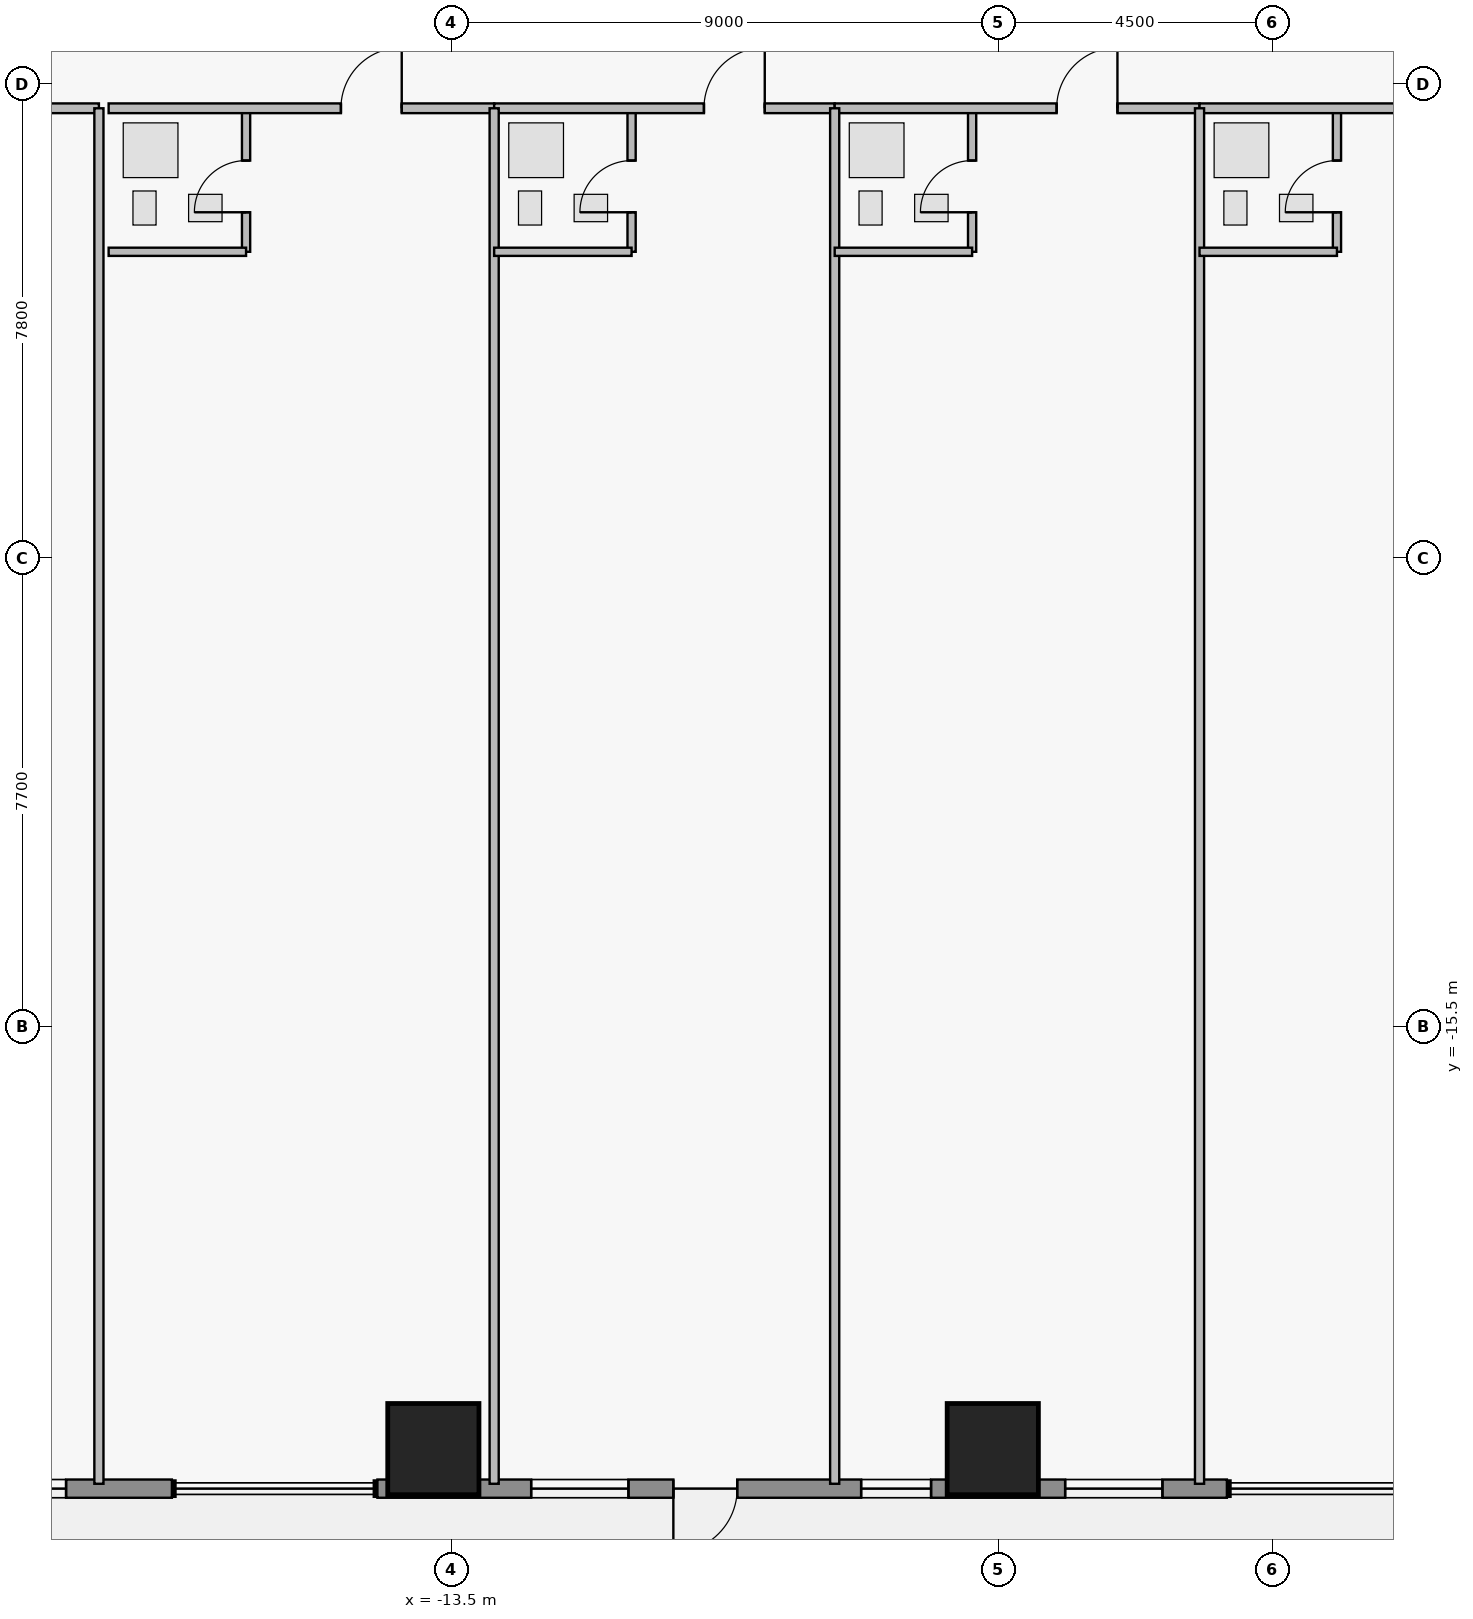
"""IFC4 building model, lengths in metres.
Left out: names, types, materials, properties, quantities, classifications, styles, units other than length and angle.
Written with IfcOpenShell. Run it as: python <this file> out.ifc"""

import sys

from ifc_helpers import new_model, si_unit, direction, frame, frame_2d, origin, origin_2d, place, context, subcontext, project, spatial, rectangle, extrude, element, fill, save


model = new_model("IFC4")
c1 = context("Model", 3, precision=1e-05, world=origin(), true_north=direction((0.0, 1.0)))
c2 = subcontext(c1, "Body", "Model", "MODEL_VIEW")
j1 = project(units=[si_unit("LENGTHUNIT", "METRE"), si_unit("PLANEANGLEUNIT", "RADIAN")], contexts=[c1])
p1 = place(None, origin())
s1 = spatial("IfcSite", under=j1, at=p1, CompositionType="ELEMENT")
p2 = place(p1, origin())
s2 = spatial("IfcBuilding", under=s1, at=p2, CompositionType="ELEMENT")
p3 = place(p2, frame((0.0, 0.0, 27.6)))
s3 = spatial("IfcBuildingStorey", under=s2, at=p3, CompositionType="ELEMENT", Elevation=27.6)
for number, where, z_axis, x_axis in (
    (1, (-13.8, -22.45, 0.0), (0.0, 0.0, 1.0), (1.0, 0.0, 0.0)),
    (2, (-4.6, -22.45, 0.0), (0.0, 0.0, 1.0), (1.0, 0.0, 0.0)),
):
    element("IfcColumn", number, at=place(p3, frame(where, z_axis=z_axis, x_axis=x_axis)), inside=s3, PredefinedType="COLUMN", context=c2, shape_type="SweptSolid", body=[
        extrude(rectangle(XDim=1.5, YDim=1.5, at=origin_2d()), origin(), (0.0, 0.0, 1.0), 3.65),
    ])
p4 = place(p3, frame((-0.75, -23.1, 0.0), z_axis=(0.0, 0.0, 1.0), x_axis=(-1.0, 0.0, 0.0)))
e3 = element("IfcWall", 3, at=p4, inside=s3, PredefinedType="STANDARD", context=c2, shape_type="SweptSolid", body=[
    extrude(rectangle(XDim=13.97, YDim=0.3, at=frame_2d((6.985, 0.0))), origin(), (0.0, 0.0, 1.0), 3.43),
])
p5 = place(p4, frame((8.053, 0.0, 0.0)))
e4 = element("IfcOpeningElement", 4, at=p5, cuts=e3, PredefinedType="OPENING", context=c2, shape_type="SweptSolid", body=[
    extrude(rectangle(XDim=1.05, YDim=2.2, at=frame_2d((0.525, 1.1))), frame((0.0, 0.16, 0.0), z_axis=(0.0, -1.0, 0.0), x_axis=(1.0, 0.0, 0.0)), (0.0, 0.0, 1.0), 0.32),
])
p6 = place(p4, frame((1.06, 0.0, 0.85)))
e5 = element("IfcOpeningElement", 5, at=p6, cuts=e3, PredefinedType="OPENING", context=c2, shape_type="SweptSolid", body=[
    extrude(rectangle(XDim=1.6, YDim=1.8, at=frame_2d((0.8, 0.9))), frame((0.0, 0.16, 0.0), z_axis=(0.0, -1.0, 0.0), x_axis=(1.0, 0.0, 0.0)), (0.0, 0.0, 1.0), 0.32),
])
p7 = place(p4, frame((4.865, 0.0, 0.95)))
e6 = element("IfcOpeningElement", 6, at=p7, cuts=e3, PredefinedType="OPENING", context=c2, shape_type="SweptSolid", body=[
    extrude(rectangle(XDim=1.15, YDim=1.55, at=frame_2d((0.575, 0.775))), frame((0.0, 0.16, 0.0), z_axis=(0.0, -1.0, 0.0), x_axis=(1.0, 0.0, 0.0)), (0.0, 0.0, 1.0), 0.32),
])
p8 = place(p4, frame((9.842, 0.0, 0.85)))
e7 = element("IfcOpeningElement", 7, at=p8, cuts=e3, PredefinedType="OPENING", context=c2, shape_type="SweptSolid", body=[
    extrude(rectangle(XDim=1.6, YDim=1.8, at=frame_2d((0.8, 0.9))), frame((0.0, 0.16, 0.0), z_axis=(0.0, -1.0, 0.0), x_axis=(1.0, 0.0, 0.0)), (0.0, 0.0, 1.0), 0.32),
])
p9 = place(p3, frame((-18.1, -23.1, 0.0), z_axis=(0.0, 0.0, 1.0), x_axis=(-1.0, 0.0, 0.0)))
e8 = element("IfcWall", 8, at=p9, inside=s3, PredefinedType="STANDARD", context=c2, shape_type="SweptSolid", body=[
    extrude(rectangle(XDim=4.0, YDim=0.3, at=frame_2d((2.0, 0.0))), origin(), (0.0, 0.0, 1.0), 3.43),
])
p10 = place(p9, frame((1.74, 0.0, 0.85)))
e9 = element("IfcOpeningElement", 9, at=p10, cuts=e8, PredefinedType="OPENING", context=c2, shape_type="SweptSolid", body=[
    extrude(rectangle(XDim=1.6, YDim=1.8, at=frame_2d((0.8, 0.9))), frame((0.0, 0.16, 0.0), z_axis=(0.0, -1.0, 0.0), x_axis=(1.0, 0.0, 0.0)), (0.0, 0.0, 1.0), 0.32),
])
p11 = place(p3, frame((-25.64, -0.4, 0.0), z_axis=(0.0, 0.0, 1.0), x_axis=(1.0, 0.0, 0.0)))
e10 = element("IfcWall", 10, at=p11, inside=s3, PredefinedType="PARTITIONING", context=c2, shape_type="SweptSolid", body=[
    extrude(rectangle(XDim=6.34, YDim=0.16, at=frame_2d((3.17, 0.0))), origin(), (0.0, 0.0, 1.0), 3.43),
])
p12 = place(p11, frame((3.82, 0.0, 0.0)))
e11 = element("IfcOpeningElement", 11, at=p12, cuts=e10, PredefinedType="OPENING", context=c2, shape_type="SweptSolid", body=[
    extrude(rectangle(XDim=1.0, YDim=2.15, at=frame_2d((0.5, 1.075))), frame((0.0, 0.09, 0.0), z_axis=(0.0, -1.0, 0.0), x_axis=(1.0, 0.0, 0.0)), (0.0, 0.0, 1.0), 0.18),
])
p13 = place(p3, frame((-16.88, -2.76, 0.0), z_axis=(0.0, 0.0, 1.0), x_axis=(0.0, 1.0, 0.0)))
e12 = element("IfcWall", 12, at=p13, inside=s3, PredefinedType="PLUMBINGWALL", context=c2, shape_type="SweptSolid", body=[
    extrude(rectangle(XDim=2.36, YDim=0.135, at=frame_2d((1.18, 0.0))), origin(), (0.0, 0.0, 1.0), 3.43),
])
p14 = place(p13, frame((0.65, 0.0, 0.0)))
e13 = element("IfcOpeningElement", 13, at=p14, cuts=e12, PredefinedType="OPENING", context=c2, shape_type="SweptSolid", body=[
    extrude(rectangle(XDim=0.85, YDim=2.1, at=frame_2d((0.425, 1.05))), frame((0.0, 0.077, 0.0), z_axis=(0.0, -1.0, 0.0), x_axis=(1.0, 0.0, 0.0)), (0.0, 0.0, 1.0), 0.155),
])
p15 = place(p3, frame((-19.14, -0.4, 0.0), z_axis=(0.0, 0.0, 1.0), x_axis=(1.0, 0.0, 0.0)))
e14 = element("IfcWall", 14, at=p15, inside=s3, PredefinedType="PARTITIONING", context=c2, shape_type="SweptSolid", body=[
    extrude(rectangle(XDim=6.34, YDim=0.16, at=frame_2d((3.17, 0.0))), origin(), (0.0, 0.0, 1.0), 3.43),
])
p16 = place(p15, frame((3.82, 0.0, 0.0)))
e15 = element("IfcOpeningElement", 15, at=p16, cuts=e14, PredefinedType="OPENING", context=c2, shape_type="SweptSolid", body=[
    extrude(rectangle(XDim=1.0, YDim=2.15, at=frame_2d((0.5, 1.075))), frame((0.0, 0.09, 0.0), z_axis=(0.0, -1.0, 0.0), x_axis=(1.0, 0.0, 0.0)), (0.0, 0.0, 1.0), 0.18),
])
p17 = place(p3, frame((-10.54, -2.76, 0.0), z_axis=(0.0, 0.0, 1.0), x_axis=(0.0, 1.0, 0.0)))
e16 = element("IfcWall", 16, at=p17, inside=s3, PredefinedType="PLUMBINGWALL", context=c2, shape_type="SweptSolid", body=[
    extrude(rectangle(XDim=2.36, YDim=0.135, at=frame_2d((1.18, 0.0))), origin(), (0.0, 0.0, 1.0), 3.43),
])
p18 = place(p17, frame((0.65, 0.0, 0.0)))
e17 = element("IfcOpeningElement", 17, at=p18, cuts=e16, PredefinedType="OPENING", context=c2, shape_type="SweptSolid", body=[
    extrude(rectangle(XDim=0.85, YDim=2.1, at=frame_2d((0.425, 1.05))), frame((0.0, 0.077, 0.0), z_axis=(0.0, -1.0, 0.0), x_axis=(1.0, 0.0, 0.0)), (0.0, 0.0, 1.0), 0.155),
])
p19 = place(p3, frame((-12.8, -0.4, 0.0), z_axis=(0.0, 0.0, 1.0), x_axis=(1.0, 0.0, 0.0)))
e18 = element("IfcWall", 18, at=p19, inside=s3, PredefinedType="PARTITIONING", context=c2, shape_type="SweptSolid", body=[
    extrude(rectangle(XDim=5.6, YDim=0.16, at=frame_2d((2.8, 0.0))), origin(), (0.0, 0.0, 1.0), 3.43),
])
p20 = place(p19, frame((3.45, 0.0, 0.0)))
e19 = element("IfcOpeningElement", 19, at=p20, cuts=e18, PredefinedType="OPENING", context=c2, shape_type="SweptSolid", body=[
    extrude(rectangle(XDim=1.0, YDim=2.15, at=frame_2d((0.5, 1.075))), frame((0.0, 0.09, 0.0), z_axis=(0.0, -1.0, 0.0), x_axis=(1.0, 0.0, 0.0)), (0.0, 0.0, 1.0), 0.18),
])
p21 = place(p3, frame((-4.94, -2.76, 0.0), z_axis=(0.0, 0.0, 1.0), x_axis=(0.0, 1.0, 0.0)))
e20 = element("IfcWall", 20, at=p21, inside=s3, PredefinedType="PLUMBINGWALL", context=c2, shape_type="SweptSolid", body=[
    extrude(rectangle(XDim=2.36, YDim=0.135, at=frame_2d((1.18, 0.0))), origin(), (0.0, 0.0, 1.0), 2.668),
])
p22 = place(p21, frame((0.65, 0.0, 0.0)))
e21 = element("IfcOpeningElement", 21, at=p22, cuts=e20, PredefinedType="OPENING", context=c2, shape_type="SweptSolid", body=[
    extrude(rectangle(XDim=0.85, YDim=2.1, at=frame_2d((0.425, 1.05))), frame((0.0, 0.077, 0.0), z_axis=(0.0, -1.0, 0.0), x_axis=(1.0, 0.0, 0.0)), (0.0, 0.0, 1.0), 0.155),
])
p23 = place(p3, frame((-7.2, -0.4, 0.0), z_axis=(0.0, 0.0, 1.0), x_axis=(1.0, 0.0, 0.0)))
e22 = element("IfcWall", 22, at=p23, inside=s3, PredefinedType="PARTITIONING", context=c2, shape_type="SweptSolid", body=[
    extrude(rectangle(XDim=6.0, YDim=0.16, at=frame_2d((3.0, 0.0))), origin(), (0.0, 0.0, 1.0), 3.43),
])
p24 = place(p23, frame((3.65, 0.0, 0.0)))
e23 = element("IfcOpeningElement", 23, at=p24, cuts=e22, PredefinedType="OPENING", context=c2, shape_type="SweptSolid", body=[
    extrude(rectangle(XDim=1.0, YDim=2.15, at=frame_2d((0.5, 1.075))), frame((0.0, 0.09, 0.0), z_axis=(0.0, -1.0, 0.0), x_axis=(1.0, 0.0, 0.0)), (0.0, 0.0, 1.0), 0.18),
])
p25 = place(p3, frame((1.06, -2.76, 0.0), z_axis=(0.0, 0.0, 1.0), x_axis=(0.0, 1.0, 0.0)))
e24 = element("IfcWall", 24, at=p25, inside=s3, PredefinedType="PLUMBINGWALL", context=c2, shape_type="SweptSolid", body=[
    extrude(rectangle(XDim=2.36, YDim=0.135, at=frame_2d((1.18, 0.0))), origin(), (0.0, 0.0, 1.0), 3.43),
])
p26 = place(p25, frame((0.65, 0.0, 0.0)))
e25 = element("IfcOpeningElement", 25, at=p26, cuts=e24, PredefinedType="OPENING", context=c2, shape_type="SweptSolid", body=[
    extrude(rectangle(XDim=0.85, YDim=2.1, at=frame_2d((0.425, 1.05))), frame((0.0, 0.077, 0.0), z_axis=(0.0, -1.0, 0.0), x_axis=(1.0, 0.0, 0.0)), (0.0, 0.0, 1.0), 0.155),
])
p27 = place(p3, frame((-1.2, -0.4, 0.0), z_axis=(0.0, 0.0, 1.0), x_axis=(1.0, 0.0, 0.0)))
e26 = element("IfcWall", 26, at=p27, inside=s3, PredefinedType="PARTITIONING", context=c2, shape_type="SweptSolid", body=[
    extrude(rectangle(XDim=5.2, YDim=0.16, at=frame_2d((2.6, 0.0))), origin(), (0.0, 0.0, 1.0), 3.43),
])
p28 = place(p27, frame((3.25, 0.0, 0.0)))
e27 = element("IfcOpeningElement", 27, at=p28, cuts=e26, PredefinedType="OPENING", context=c2, shape_type="SweptSolid", body=[
    extrude(rectangle(XDim=1.0, YDim=2.15, at=frame_2d((0.5, 1.075))), frame((0.0, 0.09, 0.0), z_axis=(0.0, -1.0, 0.0), x_axis=(1.0, 0.0, 0.0)), (0.0, 0.0, 1.0), 0.18),
])
p29 = place(p3, frame((-19.3, -23.02, 0.0), z_axis=(0.0, 0.0, 1.0), x_axis=(0.0, 1.0, 0.0)))
e28 = element("IfcWall", 28, at=p29, inside=s3, PredefinedType="PARTITIONING", context=c2, shape_type="SweptSolid", body=[
    extrude(rectangle(XDim=22.62, YDim=0.15, at=frame_2d((11.31, 0.0))), origin(), (0.0, 0.0, 1.0), 3.43),
])
p30 = place(p3, frame((-19.14, -2.76, 0.0), z_axis=(0.0, 0.0, 1.0), x_axis=(1.0, 0.0, 0.0)))
e29 = element("IfcWall", 29, at=p30, inside=s3, PredefinedType="PLUMBINGWALL", context=c2, shape_type="SweptSolid", body=[
    extrude(rectangle(XDim=2.26, YDim=0.135, at=frame_2d((1.13, 0.0))), origin(), (0.0, 0.0, 1.0), 3.43),
])
p31 = place(p3, frame((-12.8, -23.02, 0.0), z_axis=(0.0, 0.0, 1.0), x_axis=(0.0, 1.0, 0.0)))
e30 = element("IfcWall", 30, at=p31, inside=s3, PredefinedType="PARTITIONING", context=c2, shape_type="SweptSolid", body=[
    extrude(rectangle(XDim=22.62, YDim=0.15, at=frame_2d((11.31, 0.0))), origin(), (0.0, 0.0, 1.0), 3.43),
])
p32 = place(p3, frame((-12.8, -2.76, 0.0), z_axis=(0.0, 0.0, 1.0), x_axis=(1.0, 0.0, 0.0)))
e31 = element("IfcWall", 31, at=p32, inside=s3, PredefinedType="PLUMBINGWALL", context=c2, shape_type="SweptSolid", body=[
    extrude(rectangle(XDim=2.26, YDim=0.135, at=frame_2d((1.13, 0.0))), origin(), (0.0, 0.0, 1.0), 3.43),
])
p33 = place(p3, frame((-7.2, -23.02, 0.0), z_axis=(0.0, 0.0, 1.0), x_axis=(0.0, 1.0, 0.0)))
e32 = element("IfcWall", 32, at=p33, inside=s3, PredefinedType="PARTITIONING", context=c2, shape_type="SweptSolid", body=[
    extrude(rectangle(XDim=22.62, YDim=0.15, at=frame_2d((11.31, 0.0))), origin(), (0.0, 0.0, 1.0), 3.43),
])
p34 = place(p3, frame((-7.2, -2.76, 0.0), z_axis=(0.0, 0.0, 1.0), x_axis=(1.0, 0.0, 0.0)))
e33 = element("IfcWall", 33, at=p34, inside=s3, PredefinedType="PLUMBINGWALL", context=c2, shape_type="SweptSolid", body=[
    extrude(rectangle(XDim=2.26, YDim=0.135, at=frame_2d((1.13, 0.0))), origin(), (0.0, 0.0, 1.0), 3.43),
])
p35 = place(p3, frame((-1.2, -23.02, 0.0), z_axis=(0.0, 0.0, 1.0), x_axis=(0.0, 1.0, 0.0)))
e34 = element("IfcWall", 34, at=p35, inside=s3, PredefinedType="PARTITIONING", context=c2, shape_type="SweptSolid", body=[
    extrude(rectangle(XDim=22.62, YDim=0.15, at=frame_2d((11.31, 0.0))), origin(), (0.0, 0.0, 1.0), 3.43),
])
p36 = place(p3, frame((-1.2, -2.76, 0.0), z_axis=(0.0, 0.0, 1.0), x_axis=(1.0, 0.0, 0.0)))
e35 = element("IfcWall", 35, at=p36, inside=s3, PredefinedType="PLUMBINGWALL", context=c2, shape_type="SweptSolid", body=[
    extrude(rectangle(XDim=2.26, YDim=0.135, at=frame_2d((1.13, 0.0))), origin(), (0.0, 0.0, 1.0), 3.43),
])
p37 = place(p5, origin())
e36 = element("IfcDoor", 36, at=p37, inside=s3, OperationType="SINGLE_SWING_RIGHT", PredefinedType="DOOR", context=c2, shape_type="SweptSolid", body=[
    extrude(rectangle(XDim=1.05, YDim=2.2, at=frame_2d((0.525, 1.1))), frame((0.0, 0.025, 0.0), z_axis=(0.0, -1.0, 0.0), x_axis=(1.0, 0.0, 0.0)), (0.0, 0.0, 1.0), 0.05),
])
fill(e4, e36)
p38 = place(p6, origin())
e37 = element("IfcWindow", 37, at=p38, inside=s3, PartitioningType="SINGLE_PANEL", PredefinedType="WINDOW", context=c2, shape_type="SweptSolid", body=[
    extrude(rectangle(XDim=1.6, YDim=1.8, at=frame_2d((0.8, 0.9))), frame((0.0, 0.03, 0.0), z_axis=(0.0, -1.0, 0.0), x_axis=(1.0, 0.0, 0.0)), (0.0, 0.0, 1.0), 0.06),
])
fill(e5, e37)
p39 = place(p7, origin())
e38 = element("IfcWindow", 38, at=p39, inside=s3, PartitioningType="SINGLE_PANEL", PredefinedType="WINDOW", context=c2, shape_type="SweptSolid", body=[
    extrude(rectangle(XDim=1.15, YDim=1.55, at=frame_2d((0.575, 0.775))), frame((0.0, 0.03, 0.0), z_axis=(0.0, -1.0, 0.0), x_axis=(1.0, 0.0, 0.0)), (0.0, 0.0, 1.0), 0.06),
])
fill(e6, e38)
p40 = place(p8, origin())
e39 = element("IfcWindow", 39, at=p40, inside=s3, PartitioningType="SINGLE_PANEL", PredefinedType="WINDOW", context=c2, shape_type="SweptSolid", body=[
    extrude(rectangle(XDim=1.6, YDim=1.8, at=frame_2d((0.8, 0.9))), frame((0.0, 0.03, 0.0), z_axis=(0.0, -1.0, 0.0), x_axis=(1.0, 0.0, 0.0)), (0.0, 0.0, 1.0), 0.06),
])
fill(e7, e39)
p41 = place(p10, origin())
e40 = element("IfcWindow", 40, at=p41, inside=s3, PartitioningType="SINGLE_PANEL", PredefinedType="WINDOW", context=c2, shape_type="SweptSolid", body=[
    extrude(rectangle(XDim=1.6, YDim=1.8, at=frame_2d((0.8, 0.9))), frame((0.0, 0.03, 0.0), z_axis=(0.0, -1.0, 0.0), x_axis=(1.0, 0.0, 0.0)), (0.0, 0.0, 1.0), 0.06),
])
fill(e9, e40)
p42 = place(p14, origin())
e41 = element("IfcDoor", 41, at=p42, inside=s3, OperationType="SINGLE_SWING_LEFT", PredefinedType="DOOR", context=c2, shape_type="SweptSolid", body=[
    extrude(rectangle(XDim=0.85, YDim=2.1, at=frame_2d((0.425, 1.05))), frame((0.0, 0.025, 0.0), z_axis=(0.0, -1.0, 0.0), x_axis=(1.0, 0.0, 0.0)), (0.0, 0.0, 1.0), 0.05),
])
fill(e13, e41)
p43 = place(p16, origin())
e42 = element("IfcDoor", 42, at=p43, inside=s3, OperationType="SINGLE_SWING_RIGHT", PredefinedType="DOOR", context=c2, shape_type="SweptSolid", body=[
    extrude(rectangle(XDim=1.0, YDim=2.15, at=frame_2d((0.5, 1.075))), frame((0.0, 0.025, 0.0), z_axis=(0.0, -1.0, 0.0), x_axis=(1.0, 0.0, 0.0)), (0.0, 0.0, 1.0), 0.05),
])
fill(e15, e42)
p44 = place(p18, origin())
e43 = element("IfcDoor", 43, at=p44, inside=s3, OperationType="SINGLE_SWING_LEFT", PredefinedType="DOOR", context=c2, shape_type="SweptSolid", body=[
    extrude(rectangle(XDim=0.85, YDim=2.1, at=frame_2d((0.425, 1.05))), frame((0.0, 0.025, 0.0), z_axis=(0.0, -1.0, 0.0), x_axis=(1.0, 0.0, 0.0)), (0.0, 0.0, 1.0), 0.05),
])
fill(e17, e43)
p45 = place(p20, origin())
e44 = element("IfcDoor", 44, at=p45, inside=s3, OperationType="SINGLE_SWING_RIGHT", PredefinedType="DOOR", context=c2, shape_type="SweptSolid", body=[
    extrude(rectangle(XDim=1.0, YDim=2.15, at=frame_2d((0.5, 1.075))), frame((0.0, 0.025, 0.0), z_axis=(0.0, -1.0, 0.0), x_axis=(1.0, 0.0, 0.0)), (0.0, 0.0, 1.0), 0.05),
])
fill(e19, e44)
p46 = place(p22, origin())
e45 = element("IfcDoor", 45, at=p46, inside=s3, OperationType="SINGLE_SWING_LEFT", PredefinedType="DOOR", context=c2, shape_type="SweptSolid", body=[
    extrude(rectangle(XDim=0.85, YDim=2.1, at=frame_2d((0.425, 1.05))), frame((0.0, 0.025, 0.0), z_axis=(0.0, -1.0, 0.0), x_axis=(1.0, 0.0, 0.0)), (0.0, 0.0, 1.0), 0.05),
])
fill(e21, e45)
p47 = place(p24, origin())
e46 = element("IfcDoor", 46, at=p47, inside=s3, OperationType="SINGLE_SWING_RIGHT", PredefinedType="DOOR", context=c2, shape_type="SweptSolid", body=[
    extrude(rectangle(XDim=1.0, YDim=2.15, at=frame_2d((0.5, 1.075))), frame((0.0, 0.025, 0.0), z_axis=(0.0, -1.0, 0.0), x_axis=(1.0, 0.0, 0.0)), (0.0, 0.0, 1.0), 0.05),
])
fill(e23, e46)
p48 = place(p26, origin())
e47 = element("IfcDoor", 47, at=p48, inside=s3, OperationType="SINGLE_SWING_LEFT", PredefinedType="DOOR", context=c2, shape_type="SweptSolid", body=[
    extrude(rectangle(XDim=0.85, YDim=2.1, at=frame_2d((0.425, 1.05))), frame((0.0, 0.025, 0.0), z_axis=(0.0, -1.0, 0.0), x_axis=(1.0, 0.0, 0.0)), (0.0, 0.0, 1.0), 0.05),
])
fill(e25, e47)
save(model, sys.argv[1])
